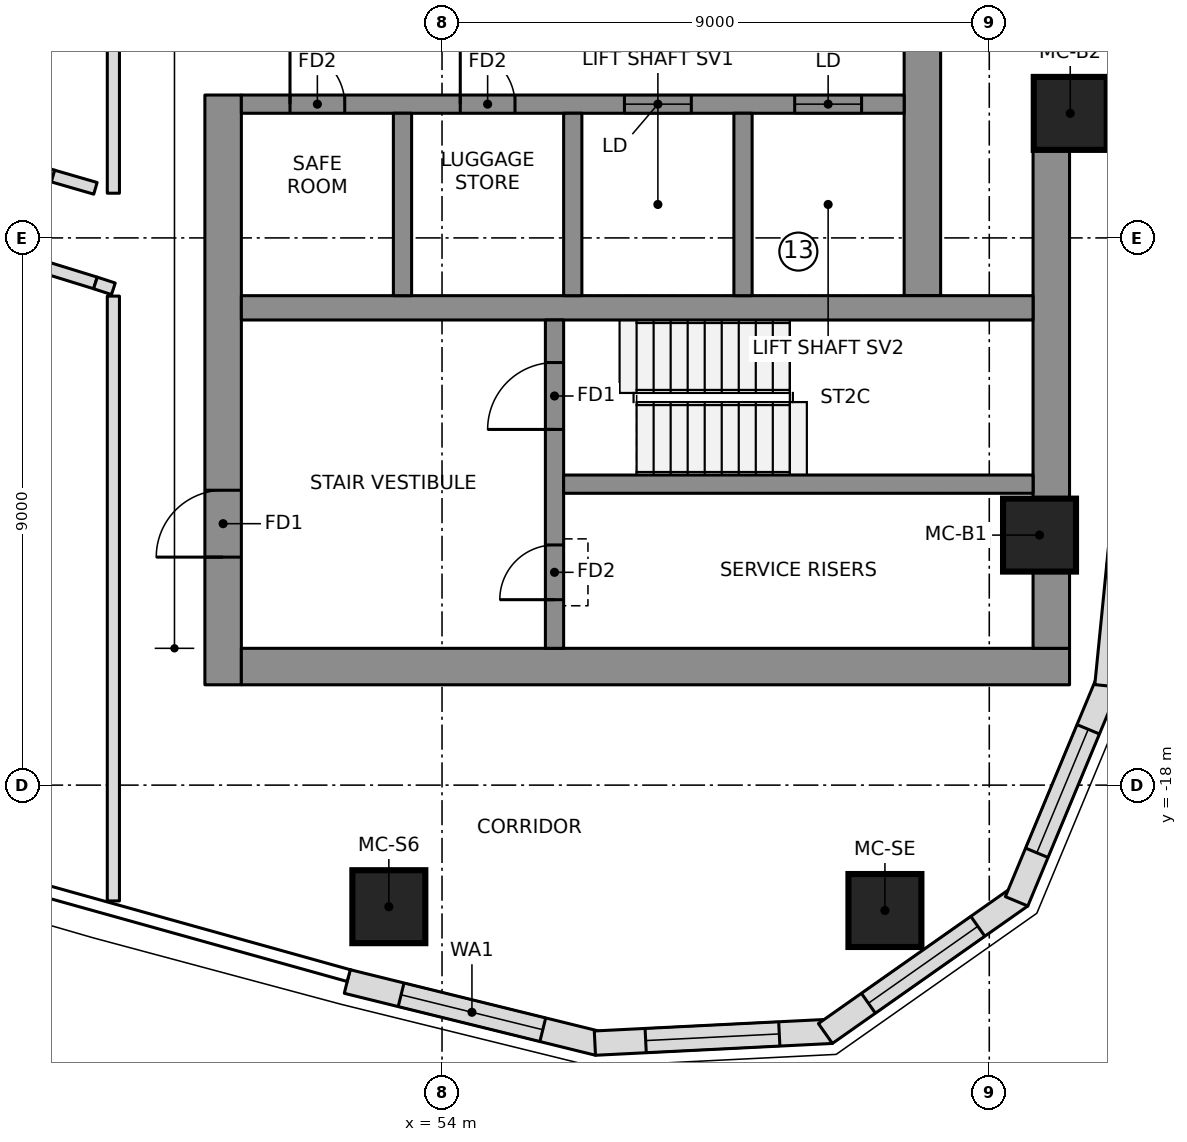
"""IFC4 building model, lengths in metres.
Left out: names, types, materials, properties, quantities, classifications, styles, units other than length and angle.
Written with IfcOpenShell. Run it as: python <this file> out.ifc"""

import sys

from ifc_helpers import new_model, si_unit, direction, frame, frame_2d, origin, origin_2d, place, context, subcontext, project, spatial, polyline, rectangle, outline, extrude, element, fill, save


model = new_model("IFC4")
c1 = context("Model", 3, precision=1e-05, world=origin(), true_north=direction((0.0, 1.0)))
c2 = subcontext(c1, "Body", "Model", "MODEL_VIEW")
j1 = project(units=[si_unit("LENGTHUNIT", "METRE"), si_unit("PLANEANGLEUNIT", "RADIAN")], contexts=[c1])
p1 = place(None, origin())
s1 = spatial("IfcSite", under=j1, at=p1, CompositionType="ELEMENT")
p2 = place(p1, origin())
s2 = spatial("IfcBuilding", under=s1, at=p2, CompositionType="ELEMENT")
p3 = place(p2, frame((0.0, 0.0, 227.9)))
s3 = spatial("IfcBuildingStorey", under=s2, at=p3, CompositionType="ELEMENT", Elevation=227.9)
p4 = place(p3, frame((50.4, -16.35, 0.0), z_axis=(0.0, 0.0, 1.0), x_axis=(0.0, 1.0, 0.0)))
e1 = element("IfcWall", 1, at=p4, inside=s3, PredefinedType="SHEAR", context=c2, shape_type="SweptSolid", body=[
    extrude(rectangle(XDim=9.7, YDim=0.6, at=frame_2d((4.85, 0.0))), origin(), (0.0, 0.0, 1.0), 3.55),
])
p5 = place(p4, frame((2.1, 0.0, 0.0)))
e2 = element("IfcOpeningElement", 2, at=p5, cuts=e1, PredefinedType="OPENING", context=c2, shape_type="SweptSolid", body=[
    extrude(rectangle(XDim=1.1, YDim=2.1, at=frame_2d((0.55, 1.05))), frame((0.0, 0.31, 0.0), z_axis=(0.0, -1.0, 0.0), x_axis=(1.0, 0.0, 0.0)), (0.0, 0.0, 1.0), 0.62),
])
p6 = place(p3, frame((50.7, -16.05, 0.0), z_axis=(0.0, 0.0, 1.0), x_axis=(1.0, 0.0, 0.0)))
e3 = element("IfcWall", 3, at=p6, inside=s3, PredefinedType="SHEAR", context=c2, shape_type="SweptSolid", body=[
    extrude(rectangle(XDim=13.62, YDim=0.6, at=frame_2d((6.81, 0.0))), origin(), (0.0, 0.0, 1.0), 3.55),
])
p7 = place(p3, frame((64.02, -15.75, 0.0), z_axis=(0.0, 0.0, 1.0), x_axis=(0.0, 1.0, 0.0)))
e4 = element("IfcWall", 4, at=p7, inside=s3, PredefinedType="SHEAR", context=c2, shape_type="SweptSolid", body=[
    extrude(rectangle(XDim=8.248, YDim=0.6, at=frame_2d((4.124, 0.0))), origin(), (0.0, 0.0, 1.0), 3.55),
])
p8 = place(p3, frame((61.9, -9.95, 0.0), z_axis=(0.0, 0.0, 1.0), x_axis=(0.0, 1.0, 0.0)))
e5 = element("IfcWall", 5, at=p8, inside=s3, PredefinedType="SHEAR", context=c2, shape_type="SweptSolid", body=[
    extrude(rectangle(XDim=19.9, YDim=0.6, at=frame_2d((9.95, 0.0))), origin(), (0.0, 0.0, 1.0), 3.55),
])
p9 = place(p3, frame((50.7, -10.15, 0.0), z_axis=(0.0, 0.0, 1.0), x_axis=(1.0, 0.0, 0.0)))
e6 = element("IfcWall", 6, at=p9, inside=s3, PredefinedType="SHEAR", context=c2, shape_type="SweptSolid", body=[
    extrude(rectangle(XDim=13.02, YDim=0.4, at=frame_2d((6.51, 0.0))), origin(), (0.0, 0.0, 1.0), 3.55),
])
p10 = place(p3, frame((50.7, -6.8, 0.0), z_axis=(0.0, 0.0, 1.0), x_axis=(1.0, 0.0, 0.0)))
e7 = element("IfcWall", 7, at=p10, inside=s3, PredefinedType="SHEAR", context=c2, shape_type="SweptSolid", body=[
    extrude(rectangle(XDim=10.9, YDim=0.3, at=frame_2d((5.45, 0.0))), origin(), (0.0, 0.0, 1.0), 3.55),
])
p11 = place(p10, frame((6.3, 0.0, 0.0)))
e8 = element("IfcOpeningElement", 8, at=p11, cuts=e7, PredefinedType="OPENING", context=c2, shape_type="SweptSolid", body=[
    extrude(rectangle(XDim=1.1, YDim=2.1, at=frame_2d((0.55, 1.05))), frame((0.0, 0.16, 0.0), z_axis=(0.0, -1.0, 0.0), x_axis=(1.0, 0.0, 0.0)), (0.0, 0.0, 1.0), 0.32),
])
p12 = place(p10, frame((9.1, 0.0, 0.0)))
e9 = element("IfcOpeningElement", 9, at=p12, cuts=e7, PredefinedType="OPENING", context=c2, shape_type="SweptSolid", body=[
    extrude(rectangle(XDim=1.1, YDim=2.1, at=frame_2d((0.55, 1.05))), frame((0.0, 0.16, 0.0), z_axis=(0.0, -1.0, 0.0), x_axis=(1.0, 0.0, 0.0)), (0.0, 0.0, 1.0), 0.32),
])
p13 = place(p10, frame((0.8, 0.0, 0.0)))
e10 = element("IfcOpeningElement", 10, at=p13, cuts=e7, PredefinedType="OPENING", context=c2, shape_type="SweptSolid", body=[
    extrude(rectangle(XDim=0.9, YDim=2.1, at=frame_2d((0.45, 1.05))), frame((0.0, 0.16, 0.0), z_axis=(0.0, -1.0, 0.0), x_axis=(1.0, 0.0, 0.0)), (0.0, 0.0, 1.0), 0.32),
])
p14 = place(p10, frame((3.6, 0.0, 0.0)))
e11 = element("IfcOpeningElement", 11, at=p14, cuts=e7, PredefinedType="OPENING", context=c2, shape_type="SweptSolid", body=[
    extrude(rectangle(XDim=0.9, YDim=2.1, at=frame_2d((0.45, 1.05))), frame((0.0, 0.16, 0.0), z_axis=(0.0, -1.0, 0.0), x_axis=(1.0, 0.0, 0.0)), (0.0, 0.0, 1.0), 0.32),
])
for number, where, z_axis, x_axis in (
    (12, (53.35, -9.95, 0.0), (0.0, 0.0, 1.0), (0.0, 1.0, 0.0)),
    (13, (56.15, -9.95, 0.0), (0.0, 0.0, 1.0), (0.0, 1.0, 0.0)),
    (14, (58.95, -9.95, 0.0), (0.0, 0.0, 1.0), (0.0, 1.0, 0.0)),
):
    element("IfcWall", number, at=place(p3, frame(where, z_axis=z_axis, x_axis=x_axis)), inside=s3, PredefinedType="SHEAR", context=c2, shape_type="SweptSolid", body=[
        extrude(rectangle(XDim=3.0, YDim=0.3, at=frame_2d((1.5, 0.0))), origin(), (0.0, 0.0, 1.0), 3.55),
    ])
p15 = place(p3, frame((55.85, -15.75, 0.0), z_axis=(0.0, 0.0, 1.0), x_axis=(0.0, 1.0, 0.0)))
e15 = element("IfcWall", 15, at=p15, inside=s3, PredefinedType="SHEAR", context=c2, shape_type="SweptSolid", body=[
    extrude(rectangle(XDim=5.4, YDim=0.3, at=frame_2d((2.7, 0.0))), origin(), (0.0, 0.0, 1.0), 3.55),
])
p16 = place(p15, frame((3.6, 0.0, 0.0)))
e16 = element("IfcOpeningElement", 16, at=p16, cuts=e15, PredefinedType="OPENING", context=c2, shape_type="SweptSolid", body=[
    extrude(rectangle(XDim=1.1, YDim=2.1, at=frame_2d((0.55, 1.05))), frame((0.0, 0.16, 0.0), z_axis=(0.0, -1.0, 0.0), x_axis=(1.0, 0.0, 0.0)), (0.0, 0.0, 1.0), 0.32),
])
p17 = place(p15, frame((0.8, 0.0, 0.0)))
e17 = element("IfcOpeningElement", 17, at=p17, cuts=e15, PredefinedType="OPENING", context=c2, shape_type="SweptSolid", body=[
    extrude(rectangle(XDim=0.9, YDim=2.1, at=frame_2d((0.45, 1.05))), frame((0.0, 0.16, 0.0), z_axis=(0.0, -1.0, 0.0), x_axis=(1.0, 0.0, 0.0)), (0.0, 0.0, 1.0), 0.32),
])
p18 = place(p3, frame((56.0, -13.05, 0.0), z_axis=(0.0, 0.0, 1.0), x_axis=(1.0, 0.0, 0.0)))
e18 = element("IfcWall", 18, at=p18, inside=s3, PredefinedType="SHEAR", context=c2, shape_type="SweptSolid", body=[
    extrude(rectangle(XDim=7.72, YDim=0.3, at=frame_2d((3.86, 0.0))), origin(), (0.0, 0.0, 1.0), 3.55),
])
for number, where, z_axis, x_axis in (
    (19, (53.125, -20.0, 0.0), (0.0, 0.0, 1.0), (1.0, 0.0, 0.0)),
    (20, (61.284, -20.062, 0.0), (0.0, 0.0, 1.0), (1.0, 0.0, 0.0)),
    (21, (63.826, -13.888, 0.0), (0.0, 0.0, 1.0), (1.0, 0.0, 0.0)),
    (22, (64.332, -6.952, 0.0), (0.0, 0.0, 1.0), (1.0, 0.0, 0.0)),
):
    element("IfcColumn", number, at=place(p3, frame(where, z_axis=z_axis, x_axis=x_axis)), inside=s3, PredefinedType="COLUMN", context=c2, shape_type="SweptSolid", body=[
        extrude(rectangle(XDim=1.2, YDim=1.2, at=origin_2d()), origin(), (0.0, 0.0, 1.0), 3.55),
    ])
p19 = place(p3, frame((52.441, -21.23, 0.0), z_axis=(0.0, 0.0, 1.0), x_axis=(0.970902342456, -0.23947576373, 0.0)))
e23 = element("IfcWall", 23, at=p19, inside=s3, PredefinedType="NOTDEFINED", context=c2, shape_type="SweptSolid", body=[
    extrude(outline(polyline([(0.0, -0.2), (4.255, -0.2), (4.197, 0.2), (0.0, 0.2), (0.0, -0.2)])), origin(), (0.0, 0.0, 1.0), 3.25),
])
p20 = place(p19, frame((0.913, 0.0, 0.5)))
e24 = element("IfcOpeningElement", 24, at=p20, cuts=e23, PredefinedType="OPENING", context=c2, shape_type="SweptSolid", body=[
    extrude(rectangle(XDim=2.4, YDim=2.0, at=frame_2d((1.2, 1.0))), frame((0.0, 0.21, 0.0), z_axis=(0.0, -1.0, 0.0), x_axis=(1.0, 0.0, 0.0)), (0.0, 0.0, 1.0), 0.42),
])
p21 = place(p3, frame((56.543, -22.242, 0.0), z_axis=(0.0, 0.0, 1.0), x_axis=(0.998758875872, 0.049806705046, 0.0)))
e25 = element("IfcWall", 25, at=p21, inside=s3, PredefinedType="NOTDEFINED", context=c2, shape_type="SweptSolid", body=[
    extrude(outline(polyline([(-0.029, -0.2), (3.871, -0.2), (3.756, 0.2), (0.029, 0.2), (-0.029, -0.2)])), origin(), (0.0, 0.0, 1.0), 3.25),
])
p22 = place(p21, frame((0.807, 0.0, 0.6)))
e26 = element("IfcOpeningElement", 26, at=p22, cuts=e25, PredefinedType="OPENING", context=c2, shape_type="SweptSolid", body=[
    extrude(outline(polyline([(0.0, 1.35), (0.084, 1.771), (0.322, 2.128), (0.679, 2.366), (1.1, 2.45), (1.521, 2.366), (1.878, 2.128), (2.116, 1.771), (2.2, 1.35), (2.2, 1.1), (2.116, 0.679), (1.878, 0.322), (1.521, 0.084), (1.1, 0.0), (0.679, 0.084), (0.322, 0.322), (0.084, 0.679), (0.0, 1.1), (0.0, 1.35)])), frame((0.0, 0.21, 0.0), z_axis=(0.0, -1.0, 0.0), x_axis=(1.0, 0.0, 0.0)), (0.0, 0.0, 1.0), 0.42),
])
p23 = place(p3, frame((60.352, -22.052, 0.0), z_axis=(0.0, 0.0, 1.0), x_axis=(0.817942545532, 0.575299915009, 0.0)))
e27 = element("IfcWall", 27, at=p23, inside=s3, PredefinedType="NOTDEFINED", context=c2, shape_type="SweptSolid", body=[
    extrude(outline(polyline([(-0.058, -0.2), (3.871, -0.2), (3.756, 0.2), (0.058, 0.2), (-0.058, -0.2)])), origin(), (0.0, 0.0, 1.0), 3.25),
])
p24 = place(p23, frame((0.807, 0.0, 0.6)))
e28 = element("IfcOpeningElement", 28, at=p24, cuts=e27, PredefinedType="OPENING", context=c2, shape_type="SweptSolid", body=[
    extrude(outline(polyline([(0.0, 1.35), (0.084, 1.771), (0.322, 2.128), (0.679, 2.366), (1.1, 2.45), (1.521, 2.366), (1.878, 2.128), (2.116, 1.771), (2.2, 1.35), (2.2, 1.1), (2.116, 0.679), (1.878, 0.322), (1.521, 0.084), (1.1, 0.0), (0.679, 0.084), (0.322, 0.322), (0.084, 0.679), (0.0, 1.1), (0.0, 1.35)])), frame((0.0, 0.21, 0.0), z_axis=(0.0, -1.0, 0.0), x_axis=(1.0, 0.0, 0.0)), (0.0, 0.0, 1.0), 0.42),
])
p25 = place(p3, frame((63.471, -19.858, 0.0), z_axis=(0.0, 0.0, 1.0), x_axis=(0.3844335483, 0.923152667191, 0.0)))
e29 = element("IfcWall", 29, at=p25, inside=s3, PredefinedType="NOTDEFINED", context=c2, shape_type="SweptSolid", body=[
    extrude(outline(polyline([(-0.058, -0.2), (3.843, -0.2), (3.784, 0.2), (0.058, 0.2), (-0.058, -0.2)])), origin(), (0.0, 0.0, 1.0), 3.25),
])
p26 = place(p25, frame((0.807, 0.0, 0.6)))
e30 = element("IfcOpeningElement", 30, at=p26, cuts=e29, PredefinedType="OPENING", context=c2, shape_type="SweptSolid", body=[
    extrude(outline(polyline([(0.0, 1.35), (0.084, 1.771), (0.322, 2.128), (0.679, 2.366), (1.1, 2.45), (1.521, 2.366), (1.878, 2.128), (2.116, 1.771), (2.2, 1.35), (2.2, 1.1), (2.116, 0.679), (1.878, 0.322), (1.521, 0.084), (1.1, 0.0), (0.679, 0.084), (0.322, 0.322), (0.084, 0.679), (0.0, 1.1), (0.0, 1.35)])), frame((0.0, 0.21, 0.0), z_axis=(0.0, -1.0, 0.0), x_axis=(1.0, 0.0, 0.0)), (0.0, 0.0, 1.0), 0.42),
])
p27 = place(p3, frame((64.938, -16.337, 0.0), z_axis=(0.0, 0.0, 1.0), x_axis=(0.098718218066, 0.995115427185, 0.0)))
e31 = element("IfcWall", 31, at=p27, inside=s3, PredefinedType="NOTDEFINED", context=c2, shape_type="SweptSolid", body=[
    extrude(outline(polyline([(-0.03, -0.2), (4.096, -0.2), (4.09, 0.2), (0.03, 0.2), (-0.03, -0.2)])), origin(), (0.0, 0.0, 1.0), 3.25),
])
p28 = place(p27, frame((1.926, 0.0, 0.5)))
e32 = element("IfcOpeningElement", 32, at=p28, cuts=e31, PredefinedType="OPENING", context=c2, shape_type="SweptSolid", body=[
    extrude(rectangle(XDim=1.9, YDim=2.0, at=frame_2d((0.95, 1.0))), frame((0.0, 0.21, 0.0), z_axis=(0.0, -1.0, 0.0), x_axis=(1.0, 0.0, 0.0)), (0.0, 0.0, 1.0), 0.42),
])
p29 = place(p3, frame((47.602, -7.982, 0.0), z_axis=(0.0, 0.0, 1.0), x_axis=(-0.95461224237, 0.297851417181, 0.0)))
e33 = element("IfcWall", 33, at=p29, inside=s3, PredefinedType="PARTITIONING", context=c2, shape_type="SweptSolid", body=[
    extrude(rectangle(XDim=0.788, YDim=0.2, at=frame_2d((0.394, 0.0))), origin(), (0.0, 0.0, 1.0), 3.25),
])
p30 = place(p3, frame((41.898, -7.764, 0.0), z_axis=(0.0, 0.0, 1.0), x_axis=(0.955502033518, -0.294984514752, 0.0)))
e34 = element("IfcWall", 34, at=p30, inside=s3, PredefinedType="PARTITIONING", context=c2, shape_type="SweptSolid", body=[
    extrude(rectangle(XDim=6.7, YDim=0.2, at=frame_2d((3.35, 0.0))), origin(), (0.0, 0.0, 1.0), 3.25),
])
p31 = place(p30, frame((3.95, 0.0, 0.0)))
e35 = element("IfcOpeningElement", 35, at=p31, cuts=e34, PredefinedType="OPENING", context=c2, shape_type="SweptSolid", body=[
    extrude(rectangle(XDim=1.5, YDim=2.1, at=frame_2d((0.75, 1.05))), frame((0.0, 0.11, 0.0), z_axis=(0.0, -1.0, 0.0), x_axis=(1.0, 0.0, 0.0)), (0.0, 0.0, 1.0), 0.22),
])
p32 = place(p3, frame((48.3, -8.185, 0.0), z_axis=(0.0, 0.0, 1.0), x_axis=(-0.960439023181, 0.278490363839, 0.0)))
e36 = element("IfcWall", 36, at=p32, inside=s3, PredefinedType="PARTITIONING", context=c2, shape_type="SweptSolid", body=[
    extrude(rectangle(XDim=0.727, YDim=0.2, at=frame_2d((0.363, 0.0))), origin(), (0.0, 0.0, 1.0), 3.25),
])
p33 = place(p3, frame((48.595, 8.265, 0.0), z_axis=(0.0, 0.0, 1.0), x_axis=(0.0, -1.0, 0.0)))
e37 = element("IfcWall", 37, at=p33, inside=s3, PredefinedType="PARTITIONING", context=c2, shape_type="SweptSolid", body=[
    extrude(rectangle(XDim=16.53, YDim=0.2, at=frame_2d((8.265, 0.0))), origin(), (0.0, 0.0, 1.0), 3.25),
])
p34 = place(p3, frame((48.3, -9.741, 0.0), z_axis=(0.0, 0.0, 1.0), x_axis=(0.950709666312, -0.31008245739, 0.0)))
e38 = element("IfcWall", 38, at=p34, inside=s3, PredefinedType="PARTITIONING", context=c2, shape_type="SweptSolid", body=[
    extrude(rectangle(XDim=0.31, YDim=0.2, at=frame_2d((0.155, 0.0))), origin(), (0.0, 0.0, 1.0), 3.25),
])
p35 = place(p3, frame((48.595, -9.957, 0.0), z_axis=(0.0, 0.0, 1.0), x_axis=(0.0, -1.0, 0.0)))
e39 = element("IfcWall", 39, at=p35, inside=s3, PredefinedType="PARTITIONING", context=c2, shape_type="SweptSolid", body=[
    extrude(rectangle(XDim=9.947, YDim=0.2, at=frame_2d((4.974, 0.0))), origin(), (0.0, 0.0, 1.0), 3.25),
])
p36 = place(p20, origin())
e40 = element("IfcWindow", 40, at=p36, inside=s3, PartitioningType="SINGLE_PANEL", PredefinedType="WINDOW", context=c2, shape_type="SweptSolid", body=[
    extrude(rectangle(XDim=2.4, YDim=2.0, at=frame_2d((1.2, 1.0))), frame((0.0, 0.17, 0.0), z_axis=(0.0, -1.0, 0.0), x_axis=(1.0, 0.0, 0.0)), (0.0, 0.0, 1.0), 0.06),
])
fill(e24, e40)
p37 = place(p22, origin())
e41 = element("IfcWindow", 41, at=p37, inside=s3, PartitioningType="SINGLE_PANEL", PredefinedType="WINDOW", context=c2, shape_type="SweptSolid", body=[
    extrude(outline(polyline([(0.0, 1.35), (0.084, 1.771), (0.322, 2.128), (0.679, 2.366), (1.1, 2.45), (1.521, 2.366), (1.878, 2.128), (2.116, 1.771), (2.2, 1.35), (2.2, 1.1), (2.116, 0.679), (1.878, 0.322), (1.521, 0.084), (1.1, 0.0), (0.679, 0.084), (0.322, 0.322), (0.084, 0.679), (0.0, 1.1), (0.0, 1.35)])), frame((0.0, 0.17, 0.0), z_axis=(0.0, -1.0, 0.0), x_axis=(1.0, 0.0, 0.0)), (0.0, 0.0, 1.0), 0.06),
])
fill(e26, e41)
p38 = place(p24, origin())
e42 = element("IfcWindow", 42, at=p38, inside=s3, PartitioningType="SINGLE_PANEL", PredefinedType="WINDOW", context=c2, shape_type="SweptSolid", body=[
    extrude(outline(polyline([(0.0, 1.35), (0.084, 1.771), (0.322, 2.128), (0.679, 2.366), (1.1, 2.45), (1.521, 2.366), (1.878, 2.128), (2.116, 1.771), (2.2, 1.35), (2.2, 1.1), (2.116, 0.679), (1.878, 0.322), (1.521, 0.084), (1.1, 0.0), (0.679, 0.084), (0.322, 0.322), (0.084, 0.679), (0.0, 1.1), (0.0, 1.35)])), frame((0.0, 0.17, 0.0), z_axis=(0.0, -1.0, 0.0), x_axis=(1.0, 0.0, 0.0)), (0.0, 0.0, 1.0), 0.06),
])
fill(e28, e42)
p39 = place(p26, origin())
e43 = element("IfcWindow", 43, at=p39, inside=s3, PartitioningType="SINGLE_PANEL", PredefinedType="WINDOW", context=c2, shape_type="SweptSolid", body=[
    extrude(outline(polyline([(0.0, 1.35), (0.084, 1.771), (0.322, 2.128), (0.679, 2.366), (1.1, 2.45), (1.521, 2.366), (1.878, 2.128), (2.116, 1.771), (2.2, 1.35), (2.2, 1.1), (2.116, 0.679), (1.878, 0.322), (1.521, 0.084), (1.1, 0.0), (0.679, 0.084), (0.322, 0.322), (0.084, 0.679), (0.0, 1.1), (0.0, 1.35)])), frame((0.0, 0.17, 0.0), z_axis=(0.0, -1.0, 0.0), x_axis=(1.0, 0.0, 0.0)), (0.0, 0.0, 1.0), 0.06),
])
fill(e30, e43)
p40 = place(p11, origin())
e44 = element("IfcDoor", 44, at=p40, inside=s3, OperationType="DOUBLE_DOOR_SLIDING", PredefinedType="DOOR", context=c2, shape_type="SweptSolid", body=[
    extrude(rectangle(XDim=1.1, YDim=2.1, at=frame_2d((0.55, 1.05))), frame((0.0, 0.025, 0.0), z_axis=(0.0, -1.0, 0.0), x_axis=(1.0, 0.0, 0.0)), (0.0, 0.0, 1.0), 0.05),
])
fill(e8, e44)
p41 = place(p12, origin())
e45 = element("IfcDoor", 45, at=p41, inside=s3, OperationType="DOUBLE_DOOR_SLIDING", PredefinedType="DOOR", context=c2, shape_type="SweptSolid", body=[
    extrude(rectangle(XDim=1.1, YDim=2.1, at=frame_2d((0.55, 1.05))), frame((0.0, 0.025, 0.0), z_axis=(0.0, -1.0, 0.0), x_axis=(1.0, 0.0, 0.0)), (0.0, 0.0, 1.0), 0.05),
])
fill(e9, e45)
p42 = place(p16, origin())
e46 = element("IfcDoor", 46, at=p42, inside=s3, OperationType="SINGLE_SWING_RIGHT", PredefinedType="DOOR", context=c2, shape_type="SweptSolid", body=[
    extrude(rectangle(XDim=1.1, YDim=2.1, at=frame_2d((0.55, 1.05))), frame((0.0, 0.025, 0.0), z_axis=(0.0, -1.0, 0.0), x_axis=(1.0, 0.0, 0.0)), (0.0, 0.0, 1.0), 0.05),
])
fill(e16, e46)
p43 = place(p5, origin())
e47 = element("IfcDoor", 47, at=p43, inside=s3, OperationType="SINGLE_SWING_RIGHT", PredefinedType="DOOR", context=c2, shape_type="SweptSolid", body=[
    extrude(rectangle(XDim=1.1, YDim=2.1, at=frame_2d((0.55, 1.05))), frame((0.0, 0.025, 0.0), z_axis=(0.0, -1.0, 0.0), x_axis=(1.0, 0.0, 0.0)), (0.0, 0.0, 1.0), 0.05),
])
fill(e2, e47)
p44 = place(p17, origin())
e48 = element("IfcDoor", 48, at=p44, inside=s3, OperationType="SINGLE_SWING_LEFT", PredefinedType="DOOR", context=c2, shape_type="SweptSolid", body=[
    extrude(rectangle(XDim=0.9, YDim=2.1, at=frame_2d((0.45, 1.05))), frame((0.0, 0.025, 0.0), z_axis=(0.0, -1.0, 0.0), x_axis=(1.0, 0.0, 0.0)), (0.0, 0.0, 1.0), 0.05),
])
fill(e17, e48)
p45 = place(p13, origin())
e49 = element("IfcDoor", 49, at=p45, inside=s3, OperationType="SINGLE_SWING_LEFT", PredefinedType="DOOR", context=c2, shape_type="SweptSolid", body=[
    extrude(rectangle(XDim=0.9, YDim=2.1, at=frame_2d((0.45, 1.05))), frame((0.0, 0.025, 0.0), z_axis=(0.0, -1.0, 0.0), x_axis=(1.0, 0.0, 0.0)), (0.0, 0.0, 1.0), 0.05),
])
fill(e10, e49)
p46 = place(p14, origin())
e50 = element("IfcDoor", 50, at=p46, inside=s3, OperationType="SINGLE_SWING_LEFT", PredefinedType="DOOR", context=c2, shape_type="SweptSolid", body=[
    extrude(rectangle(XDim=0.9, YDim=2.1, at=frame_2d((0.45, 1.05))), frame((0.0, 0.025, 0.0), z_axis=(0.0, -1.0, 0.0), x_axis=(1.0, 0.0, 0.0)), (0.0, 0.0, 1.0), 0.05),
])
fill(e11, e50)
save(model, sys.argv[1])
